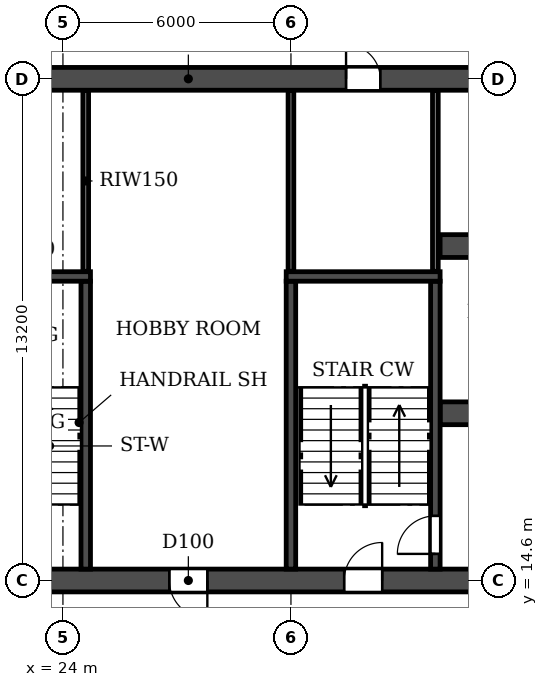
"""IFC4 building model, lengths in metres.
Left out: names, types, materials, properties, quantities, classifications, styles, units other than length and angle.
Written with IfcOpenShell. Run it as: python <this file> out.ifc"""

import sys

from ifc_helpers import new_model, si_unit, direction, frame, frame_2d, origin, place, context, subcontext, project, spatial, rectangle, extrude, element, fill, save


model = new_model("IFC4")
c1 = context("Model", 3, precision=1e-05, world=origin(), true_north=direction((0.0, 1.0)))
c2 = subcontext(c1, "Body", "Model", "MODEL_VIEW")
j1 = project(units=[si_unit("LENGTHUNIT", "METRE"), si_unit("PLANEANGLEUNIT", "RADIAN")], contexts=[c1])
p1 = place(None, origin())
s1 = spatial("IfcSite", under=j1, at=p1, CompositionType="ELEMENT")
p2 = place(p1, origin())
s2 = spatial("IfcBuilding", under=s1, at=p2, CompositionType="ELEMENT")
p3 = place(p2, frame((0.0, 0.0, 33.3)))
s3 = spatial("IfcBuildingStorey", under=s2, at=p3, CompositionType="ELEMENT", Elevation=33.3)
p4 = place(p3, frame((2.6, 14.6, 0.0), z_axis=(0.0, 0.0, 1.0), x_axis=(1.0, 0.0, 0.0)))
e1 = element("IfcWall", 1, at=p4, inside=s3, PredefinedType="SOLIDWALL", context=c2, shape_type="SweptSolid", body=[
    extrude(rectangle(XDim=96.8, YDim=0.6, at=frame_2d((48.4, 0.0))), origin(), (0.0, 0.0, 1.0), 3.05),
])
p5 = place(p4, frame((1.8, 0.0, 0.0)))
e2 = element("IfcOpeningElement", 2, at=p5, cuts=e1, PredefinedType="OPENING", context=c2, shape_type="SweptSolid", body=[
    extrude(rectangle(XDim=1.0, YDim=2.1, at=frame_2d((0.5, 1.05))), frame((0.0, 0.31, 0.0), z_axis=(0.0, -1.0, 0.0), x_axis=(1.0, 0.0, 0.0)), (0.0, 0.0, 1.0), 0.62),
])
p6 = place(p4, frame((9.5, 0.0, 0.0)))
e3 = element("IfcOpeningElement", 3, at=p6, cuts=e1, PredefinedType="OPENING", context=c2, shape_type="SweptSolid", body=[
    extrude(rectangle(XDim=1.0, YDim=2.1, at=frame_2d((0.5, 1.05))), frame((0.0, 0.31, 0.0), z_axis=(0.0, -1.0, 0.0), x_axis=(1.0, 0.0, 0.0)), (0.0, 0.0, 1.0), 0.62),
])
p7 = place(p4, frame((16.3, 0.0, 0.0)))
e4 = element("IfcOpeningElement", 4, at=p7, cuts=e1, PredefinedType="OPENING", context=c2, shape_type="SweptSolid", body=[
    extrude(rectangle(XDim=1.0, YDim=2.1, at=frame_2d((0.5, 1.05))), frame((0.0, 0.31, 0.0), z_axis=(0.0, -1.0, 0.0), x_axis=(1.0, 0.0, 0.0)), (0.0, 0.0, 1.0), 0.62),
])
p8 = place(p4, frame((24.2, 0.0, 0.0)))
e5 = element("IfcOpeningElement", 5, at=p8, cuts=e1, PredefinedType="OPENING", context=c2, shape_type="SweptSolid", body=[
    extrude(rectangle(XDim=1.0, YDim=2.1, at=frame_2d((0.5, 1.05))), frame((0.0, 0.31, 0.0), z_axis=(0.0, -1.0, 0.0), x_axis=(1.0, 0.0, 0.0)), (0.0, 0.0, 1.0), 0.62),
])
p9 = place(p4, frame((28.8, 0.0, 0.0)))
e6 = element("IfcOpeningElement", 6, at=p9, cuts=e1, PredefinedType="OPENING", context=c2, shape_type="SweptSolid", body=[
    extrude(rectangle(XDim=1.0, YDim=2.1, at=frame_2d((0.5, 1.05))), frame((0.0, 0.31, 0.0), z_axis=(0.0, -1.0, 0.0), x_axis=(1.0, 0.0, 0.0)), (0.0, 0.0, 1.0), 0.62),
])
p10 = place(p4, frame((42.7, 0.0, 0.0)))
e7 = element("IfcOpeningElement", 7, at=p10, cuts=e1, PredefinedType="OPENING", context=c2, shape_type="SweptSolid", body=[
    extrude(rectangle(XDim=1.0, YDim=2.1, at=frame_2d((0.5, 1.05))), frame((0.0, 0.31, 0.0), z_axis=(0.0, -1.0, 0.0), x_axis=(1.0, 0.0, 0.0)), (0.0, 0.0, 1.0), 0.62),
])
p11 = place(p4, frame((47.9, 0.0, 0.0)))
e8 = element("IfcOpeningElement", 8, at=p11, cuts=e1, PredefinedType="OPENING", context=c2, shape_type="SweptSolid", body=[
    extrude(rectangle(XDim=1.0, YDim=2.1, at=frame_2d((0.5, 1.05))), frame((0.0, 0.31, 0.0), z_axis=(0.0, -1.0, 0.0), x_axis=(1.0, 0.0, 0.0)), (0.0, 0.0, 1.0), 0.62),
])
p12 = place(p4, frame((53.1, 0.0, 0.0)))
e9 = element("IfcOpeningElement", 9, at=p12, cuts=e1, PredefinedType="OPENING", context=c2, shape_type="SweptSolid", body=[
    extrude(rectangle(XDim=1.0, YDim=2.1, at=frame_2d((0.5, 1.05))), frame((0.0, 0.31, 0.0), z_axis=(0.0, -1.0, 0.0), x_axis=(1.0, 0.0, 0.0)), (0.0, 0.0, 1.0), 0.62),
])
p13 = place(p4, frame((67.0, 0.0, 0.0)))
e10 = element("IfcOpeningElement", 10, at=p13, cuts=e1, PredefinedType="OPENING", context=c2, shape_type="SweptSolid", body=[
    extrude(rectangle(XDim=1.0, YDim=2.1, at=frame_2d((0.5, 1.05))), frame((0.0, 0.31, 0.0), z_axis=(0.0, -1.0, 0.0), x_axis=(1.0, 0.0, 0.0)), (0.0, 0.0, 1.0), 0.62),
])
p14 = place(p4, frame((71.6, 0.0, 0.0)))
e11 = element("IfcOpeningElement", 11, at=p14, cuts=e1, PredefinedType="OPENING", context=c2, shape_type="SweptSolid", body=[
    extrude(rectangle(XDim=1.0, YDim=2.1, at=frame_2d((0.5, 1.05))), frame((0.0, 0.31, 0.0), z_axis=(0.0, -1.0, 0.0), x_axis=(1.0, 0.0, 0.0)), (0.0, 0.0, 1.0), 0.62),
])
p15 = place(p4, frame((79.5, 0.0, 0.0)))
e12 = element("IfcOpeningElement", 12, at=p15, cuts=e1, PredefinedType="OPENING", context=c2, shape_type="SweptSolid", body=[
    extrude(rectangle(XDim=1.0, YDim=2.1, at=frame_2d((0.5, 1.05))), frame((0.0, 0.31, 0.0), z_axis=(0.0, -1.0, 0.0), x_axis=(1.0, 0.0, 0.0)), (0.0, 0.0, 1.0), 0.62),
])
p16 = place(p4, frame((88.6, 0.0, 0.0)))
e13 = element("IfcOpeningElement", 13, at=p16, cuts=e1, PredefinedType="OPENING", context=c2, shape_type="SweptSolid", body=[
    extrude(rectangle(XDim=1.0, YDim=2.1, at=frame_2d((0.5, 1.05))), frame((0.0, 0.31, 0.0), z_axis=(0.0, -1.0, 0.0), x_axis=(1.0, 0.0, 0.0)), (0.0, 0.0, 1.0), 0.62),
])
p17 = place(p3, frame((2.6, 27.8, 0.0), z_axis=(0.0, 0.0, 1.0), x_axis=(1.0, 0.0, 0.0)))
e14 = element("IfcWall", 14, at=p17, inside=s3, PredefinedType="SOLIDWALL", context=c2, shape_type="SweptSolid", body=[
    extrude(rectangle(XDim=96.8, YDim=0.6, at=frame_2d((48.4, 0.0))), origin(), (0.0, 0.0, 1.0), 3.05),
])
p18 = place(p17, frame((2.55, 0.0, 0.0)))
e15 = element("IfcOpeningElement", 15, at=p18, cuts=e14, PredefinedType="OPENING", context=c2, shape_type="SweptSolid", body=[
    extrude(rectangle(XDim=1.0, YDim=2.1, at=frame_2d((0.5, 1.05))), frame((0.0, 0.31, 0.0), z_axis=(0.0, -1.0, 0.0), x_axis=(1.0, 0.0, 0.0)), (0.0, 0.0, 1.0), 0.62),
])
p19 = place(p17, frame((10.25, 0.0, 0.0)))
e16 = element("IfcOpeningElement", 16, at=p19, cuts=e14, PredefinedType="OPENING", context=c2, shape_type="SweptSolid", body=[
    extrude(rectangle(XDim=1.0, YDim=2.1, at=frame_2d((0.5, 1.05))), frame((0.0, 0.31, 0.0), z_axis=(0.0, -1.0, 0.0), x_axis=(1.0, 0.0, 0.0)), (0.0, 0.0, 1.0), 0.62),
])
p20 = place(p17, frame((16.3, 0.0, 0.0)))
e17 = element("IfcOpeningElement", 17, at=p20, cuts=e14, PredefinedType="OPENING", context=c2, shape_type="SweptSolid", body=[
    extrude(rectangle(XDim=1.0, YDim=2.1, at=frame_2d((0.5, 1.05))), frame((0.0, 0.31, 0.0), z_axis=(0.0, -1.0, 0.0), x_axis=(1.0, 0.0, 0.0)), (0.0, 0.0, 1.0), 0.62),
])
p21 = place(p17, frame((19.65, 0.0, 0.0)))
e18 = element("IfcOpeningElement", 18, at=p21, cuts=e14, PredefinedType="OPENING", context=c2, shape_type="SweptSolid", body=[
    extrude(rectangle(XDim=0.9, YDim=2.1, at=frame_2d((0.45, 1.05))), frame((0.0, 0.31, 0.0), z_axis=(0.0, -1.0, 0.0), x_axis=(1.0, 0.0, 0.0)), (0.0, 0.0, 1.0), 0.62),
])
p22 = place(p17, frame((28.85, 0.0, 0.0)))
e19 = element("IfcOpeningElement", 19, at=p22, cuts=e14, PredefinedType="OPENING", context=c2, shape_type="SweptSolid", body=[
    extrude(rectangle(XDim=0.9, YDim=2.1, at=frame_2d((0.45, 1.05))), frame((0.0, 0.31, 0.0), z_axis=(0.0, -1.0, 0.0), x_axis=(1.0, 0.0, 0.0)), (0.0, 0.0, 1.0), 0.62),
])
p23 = place(p17, frame((34.6, 0.0, 0.0)))
e20 = element("IfcOpeningElement", 20, at=p23, cuts=e14, PredefinedType="OPENING", context=c2, shape_type="SweptSolid", body=[
    extrude(rectangle(XDim=1.0, YDim=2.1, at=frame_2d((0.5, 1.05))), frame((0.0, 0.31, 0.0), z_axis=(0.0, -1.0, 0.0), x_axis=(1.0, 0.0, 0.0)), (0.0, 0.0, 1.0), 0.62),
])
p24 = place(p17, frame((39.8, 0.0, 0.0)))
e21 = element("IfcOpeningElement", 21, at=p24, cuts=e14, PredefinedType="OPENING", context=c2, shape_type="SweptSolid", body=[
    extrude(rectangle(XDim=1.0, YDim=2.1, at=frame_2d((0.5, 1.05))), frame((0.0, 0.31, 0.0), z_axis=(0.0, -1.0, 0.0), x_axis=(1.0, 0.0, 0.0)), (0.0, 0.0, 1.0), 0.62),
])
p25 = place(p17, frame((45.0, 0.0, 0.0)))
e22 = element("IfcOpeningElement", 22, at=p25, cuts=e14, PredefinedType="OPENING", context=c2, shape_type="SweptSolid", body=[
    extrude(rectangle(XDim=1.0, YDim=2.1, at=frame_2d((0.5, 1.05))), frame((0.0, 0.31, 0.0), z_axis=(0.0, -1.0, 0.0), x_axis=(1.0, 0.0, 0.0)), (0.0, 0.0, 1.0), 0.62),
])
p26 = place(p17, frame((47.9, 0.0, 0.0)))
e23 = element("IfcOpeningElement", 23, at=p26, cuts=e14, PredefinedType="OPENING", context=c2, shape_type="SweptSolid", body=[
    extrude(rectangle(XDim=1.0, YDim=2.1, at=frame_2d((0.5, 1.05))), frame((0.0, 0.31, 0.0), z_axis=(0.0, -1.0, 0.0), x_axis=(1.0, 0.0, 0.0)), (0.0, 0.0, 1.0), 0.62),
])
p27 = place(p17, frame((50.8, 0.0, 0.0)))
e24 = element("IfcOpeningElement", 24, at=p27, cuts=e14, PredefinedType="OPENING", context=c2, shape_type="SweptSolid", body=[
    extrude(rectangle(XDim=1.0, YDim=2.1, at=frame_2d((0.5, 1.05))), frame((0.0, 0.31, 0.0), z_axis=(0.0, -1.0, 0.0), x_axis=(1.0, 0.0, 0.0)), (0.0, 0.0, 1.0), 0.62),
])
p28 = place(p17, frame((54.7, 0.0, 0.0)))
e25 = element("IfcOpeningElement", 25, at=p28, cuts=e14, PredefinedType="OPENING", context=c2, shape_type="SweptSolid", body=[
    extrude(rectangle(XDim=1.0, YDim=2.1, at=frame_2d((0.5, 1.05))), frame((0.0, 0.31, 0.0), z_axis=(0.0, -1.0, 0.0), x_axis=(1.0, 0.0, 0.0)), (0.0, 0.0, 1.0), 0.62),
])
p29 = place(p17, frame((61.2, 0.0, 0.0)))
e26 = element("IfcOpeningElement", 26, at=p29, cuts=e14, PredefinedType="OPENING", context=c2, shape_type="SweptSolid", body=[
    extrude(rectangle(XDim=1.0, YDim=2.1, at=frame_2d((0.5, 1.05))), frame((0.0, 0.31, 0.0), z_axis=(0.0, -1.0, 0.0), x_axis=(1.0, 0.0, 0.0)), (0.0, 0.0, 1.0), 0.62),
])
p30 = place(p17, frame((67.05, 0.0, 0.0)))
e27 = element("IfcOpeningElement", 27, at=p30, cuts=e14, PredefinedType="OPENING", context=c2, shape_type="SweptSolid", body=[
    extrude(rectangle(XDim=0.9, YDim=2.1, at=frame_2d((0.45, 1.05))), frame((0.0, 0.31, 0.0), z_axis=(0.0, -1.0, 0.0), x_axis=(1.0, 0.0, 0.0)), (0.0, 0.0, 1.0), 0.62),
])
p31 = place(p17, frame((76.25, 0.0, 0.0)))
e28 = element("IfcOpeningElement", 28, at=p31, cuts=e14, PredefinedType="OPENING", context=c2, shape_type="SweptSolid", body=[
    extrude(rectangle(XDim=0.9, YDim=2.1, at=frame_2d((0.45, 1.05))), frame((0.0, 0.31, 0.0), z_axis=(0.0, -1.0, 0.0), x_axis=(1.0, 0.0, 0.0)), (0.0, 0.0, 1.0), 0.62),
])
p32 = place(p17, frame((79.5, 0.0, 0.0)))
e29 = element("IfcOpeningElement", 29, at=p32, cuts=e14, PredefinedType="OPENING", context=c2, shape_type="SweptSolid", body=[
    extrude(rectangle(XDim=1.0, YDim=2.1, at=frame_2d((0.5, 1.05))), frame((0.0, 0.31, 0.0), z_axis=(0.0, -1.0, 0.0), x_axis=(1.0, 0.0, 0.0)), (0.0, 0.0, 1.0), 0.62),
])
p33 = place(p17, frame((86.05, 0.0, 0.0)))
e30 = element("IfcOpeningElement", 30, at=p33, cuts=e14, PredefinedType="OPENING", context=c2, shape_type="SweptSolid", body=[
    extrude(rectangle(XDim=1.5, YDim=2.1, at=frame_2d((0.75, 1.05))), frame((0.0, 0.31, 0.0), z_axis=(0.0, -1.0, 0.0), x_axis=(1.0, 0.0, 0.0)), (0.0, 0.0, 1.0), 0.62),
])
p34 = place(p17, frame((94.0, 0.0, 0.0)))
e31 = element("IfcOpeningElement", 31, at=p34, cuts=e14, PredefinedType="OPENING", context=c2, shape_type="SweptSolid", body=[
    extrude(rectangle(XDim=1.0, YDim=2.1, at=frame_2d((0.5, 1.05))), frame((0.0, 0.31, 0.0), z_axis=(0.0, -1.0, 0.0), x_axis=(1.0, 0.0, 0.0)), (0.0, 0.0, 1.0), 0.62),
])
p35 = place(p3, frame((33.925, 19.0, 0.0), z_axis=(0.0, 0.0, 1.0), x_axis=(1.0, 0.0, 0.0)))
e32 = element("IfcWall", 32, at=p35, inside=s3, PredefinedType="SOLIDWALL", context=c2, shape_type="SweptSolid", body=[
    extrude(rectangle(XDim=34.15, YDim=0.6, at=frame_2d((17.075, 0.0))), origin(), (0.0, 0.0, 1.0), 3.05),
])
p36 = place(p35, frame((16.175, 0.0, 0.0)))
e33 = element("IfcOpeningElement", 33, at=p36, cuts=e32, PredefinedType="OPENING", context=c2, shape_type="SweptSolid", body=[
    extrude(rectangle(XDim=1.8, YDim=2.1, at=frame_2d((0.9, 1.05))), frame((0.0, 0.31, 0.0), z_axis=(0.0, -1.0, 0.0), x_axis=(1.0, 0.0, 0.0)), (0.0, 0.0, 1.0), 0.62),
])
p37 = place(p35, frame((1.525, 0.0, 0.0)))
e34 = element("IfcOpeningElement", 34, at=p37, cuts=e32, PredefinedType="OPENING", context=c2, shape_type="SweptSolid", body=[
    extrude(rectangle(XDim=1.8, YDim=2.1, at=frame_2d((0.9, 1.05))), frame((0.0, 0.31, 0.0), z_axis=(0.0, -1.0, 0.0), x_axis=(1.0, 0.0, 0.0)), (0.0, 0.0, 1.0), 0.62),
])
p38 = place(p35, frame((8.725, 0.0, 0.0)))
e35 = element("IfcOpeningElement", 35, at=p38, cuts=e32, PredefinedType="OPENING", context=c2, shape_type="SweptSolid", body=[
    extrude(rectangle(XDim=1.1, YDim=2.1, at=frame_2d((0.55, 1.05))), frame((0.0, 0.31, 0.0), z_axis=(0.0, -1.0, 0.0), x_axis=(1.0, 0.0, 0.0)), (0.0, 0.0, 1.0), 0.62),
])
p39 = place(p35, frame((11.325, 0.0, 0.0)))
e36 = element("IfcOpeningElement", 36, at=p39, cuts=e32, PredefinedType="OPENING", context=c2, shape_type="SweptSolid", body=[
    extrude(rectangle(XDim=1.1, YDim=2.1, at=frame_2d((0.55, 1.05))), frame((0.0, 0.31, 0.0), z_axis=(0.0, -1.0, 0.0), x_axis=(1.0, 0.0, 0.0)), (0.0, 0.0, 1.0), 0.62),
])
p40 = place(p35, frame((13.925, 0.0, 0.0)))
e37 = element("IfcOpeningElement", 37, at=p40, cuts=e32, PredefinedType="OPENING", context=c2, shape_type="SweptSolid", body=[
    extrude(rectangle(XDim=1.1, YDim=2.1, at=frame_2d((0.55, 1.05))), frame((0.0, 0.31, 0.0), z_axis=(0.0, -1.0, 0.0), x_axis=(1.0, 0.0, 0.0)), (0.0, 0.0, 1.0), 0.62),
])
p41 = place(p35, frame((19.125, 0.0, 0.0)))
e38 = element("IfcOpeningElement", 38, at=p41, cuts=e32, PredefinedType="OPENING", context=c2, shape_type="SweptSolid", body=[
    extrude(rectangle(XDim=1.1, YDim=2.1, at=frame_2d((0.55, 1.05))), frame((0.0, 0.31, 0.0), z_axis=(0.0, -1.0, 0.0), x_axis=(1.0, 0.0, 0.0)), (0.0, 0.0, 1.0), 0.62),
])
p42 = place(p35, frame((21.725, 0.0, 0.0)))
e39 = element("IfcOpeningElement", 39, at=p42, cuts=e32, PredefinedType="OPENING", context=c2, shape_type="SweptSolid", body=[
    extrude(rectangle(XDim=1.1, YDim=2.1, at=frame_2d((0.55, 1.05))), frame((0.0, 0.31, 0.0), z_axis=(0.0, -1.0, 0.0), x_axis=(1.0, 0.0, 0.0)), (0.0, 0.0, 1.0), 0.62),
])
p43 = place(p35, frame((24.325, 0.0, 0.0)))
e40 = element("IfcOpeningElement", 40, at=p43, cuts=e32, PredefinedType="OPENING", context=c2, shape_type="SweptSolid", body=[
    extrude(rectangle(XDim=1.1, YDim=2.1, at=frame_2d((0.55, 1.05))), frame((0.0, 0.31, 0.0), z_axis=(0.0, -1.0, 0.0), x_axis=(1.0, 0.0, 0.0)), (0.0, 0.0, 1.0), 0.62),
])
p44 = place(p35, frame((30.825, 0.0, 0.0)))
e41 = element("IfcOpeningElement", 41, at=p44, cuts=e32, PredefinedType="OPENING", context=c2, shape_type="SweptSolid", body=[
    extrude(rectangle(XDim=1.8, YDim=2.1, at=frame_2d((0.9, 1.05))), frame((0.0, 0.31, 0.0), z_axis=(0.0, -1.0, 0.0), x_axis=(1.0, 0.0, 0.0)), (0.0, 0.0, 1.0), 0.62),
])
p45 = place(p3, frame((33.925, 23.4, 0.0), z_axis=(0.0, 0.0, 1.0), x_axis=(1.0, 0.0, 0.0)))
e42 = element("IfcWall", 42, at=p45, inside=s3, PredefinedType="SOLIDWALL", context=c2, shape_type="SweptSolid", body=[
    extrude(rectangle(XDim=34.15, YDim=0.6, at=frame_2d((17.075, 0.0))), origin(), (0.0, 0.0, 1.0), 3.05),
])
p46 = place(p45, frame((16.175, 0.0, 0.0)))
e43 = element("IfcOpeningElement", 43, at=p46, cuts=e42, PredefinedType="OPENING", context=c2, shape_type="SweptSolid", body=[
    extrude(rectangle(XDim=1.8, YDim=2.1, at=frame_2d((0.9, 1.05))), frame((0.0, 0.31, 0.0), z_axis=(0.0, -1.0, 0.0), x_axis=(1.0, 0.0, 0.0)), (0.0, 0.0, 1.0), 0.62),
])
p47 = place(p45, frame((11.025, 0.0, 0.0)))
e44 = element("IfcOpeningElement", 44, at=p47, cuts=e42, PredefinedType="OPENING", context=c2, shape_type="SweptSolid", body=[
    extrude(rectangle(XDim=1.1, YDim=2.1, at=frame_2d((0.55, 1.05))), frame((0.0, 0.31, 0.0), z_axis=(0.0, -1.0, 0.0), x_axis=(1.0, 0.0, 0.0)), (0.0, 0.0, 1.0), 0.62),
])
p48 = place(p3, frame((30.0, 14.9, 0.0), z_axis=(0.0, 0.0, 1.0), x_axis=(0.0, 1.0, 0.0)))
e45 = element("IfcWall", 45, at=p48, inside=s3, PredefinedType="SOLIDWALL", context=c2, shape_type="SweptSolid", body=[
    extrude(rectangle(XDim=7.575, YDim=0.25, at=frame_2d((3.788, 0.0))), origin(), (0.0, 0.0, 1.0), 3.05),
])
p49 = place(p3, frame((33.8, 14.9, 0.0), z_axis=(0.0, 0.0, 1.0), x_axis=(0.0, 1.0, 0.0)))
e46 = element("IfcWall", 46, at=p49, inside=s3, PredefinedType="SOLIDWALL", context=c2, shape_type="SweptSolid", body=[
    extrude(rectangle(XDim=7.575, YDim=0.25, at=frame_2d((3.788, 0.0))), origin(), (0.0, 0.0, 1.0), 3.05),
])
p50 = place(p49, frame((0.4, 0.0, 0.0)))
e47 = element("IfcOpeningElement", 47, at=p50, cuts=e46, PredefinedType="OPENING", context=c2, shape_type="SweptSolid", body=[
    extrude(rectangle(XDim=1.0, YDim=2.1, at=frame_2d((0.5, 1.05))), frame((0.0, 0.135, 0.0), z_axis=(0.0, -1.0, 0.0), x_axis=(1.0, 0.0, 0.0)), (0.0, 0.0, 1.0), 0.27),
])
p51 = place(p3, frame((29.875, 22.6, 0.0), z_axis=(0.0, 0.0, 1.0), x_axis=(1.0, 0.0, 0.0)))
e48 = element("IfcWall", 48, at=p51, inside=s3, PredefinedType="SOLIDWALL", context=c2, shape_type="SweptSolid", body=[
    extrude(rectangle(XDim=4.05, YDim=0.25, at=frame_2d((2.025, 0.0))), origin(), (0.0, 0.0, 1.0), 3.05),
])
p52 = place(p3, frame((24.6, 14.9, 0.0), z_axis=(0.0, 0.0, 1.0), x_axis=(0.0, 1.0, 0.0)))
e49 = element("IfcWall", 49, at=p52, inside=s3, PredefinedType="SOLIDWALL", context=c2, shape_type="SweptSolid", body=[
    extrude(rectangle(XDim=7.575, YDim=0.25, at=frame_2d((3.788, 0.0))), origin(), (0.0, 0.0, 1.0), 3.05),
])
p53 = place(p3, frame((20.675, 22.6, 0.0), z_axis=(0.0, 0.0, 1.0), x_axis=(1.0, 0.0, 0.0)))
e50 = element("IfcWall", 50, at=p53, inside=s3, PredefinedType="SOLIDWALL", context=c2, shape_type="SweptSolid", body=[
    extrude(rectangle(XDim=4.05, YDim=0.25, at=frame_2d((2.025, 0.0))), origin(), (0.0, 0.0, 1.0), 3.05),
])
for number, where, z_axis, x_axis in (
    (51, (24.6, 22.735, 0.0), (0.0, 0.0, 1.0), (0.0, 1.0, 0.0)),
    (52, (30.0, 22.735, 0.0), (0.0, 0.0, 1.0), (0.0, 1.0, 0.0)),
    (53, (33.8, 22.735, 0.0), (0.0, 0.0, 1.0), (0.0, 1.0, 0.0)),
):
    element("IfcWall", number, at=place(p3, frame(where, z_axis=z_axis, x_axis=x_axis)), inside=s3, PredefinedType="PARTITIONING", context=c2, shape_type="SweptSolid", body=[
        extrude(rectangle(XDim=4.755, YDim=0.15, at=frame_2d((2.377, 0.0))), origin(), (0.0, 0.0, 1.0), 3.05),
    ])
p54 = place(p22, origin())
e54 = element("IfcDoor", 54, at=p54, inside=s3, OperationType="SINGLE_SWING_LEFT", PredefinedType="DOOR", context=c2, shape_type="SweptSolid", body=[
    extrude(rectangle(XDim=0.9, YDim=2.1, at=frame_2d((0.45, 1.05))), frame((0.0, 0.025, 0.0), z_axis=(0.0, -1.0, 0.0), x_axis=(1.0, 0.0, 0.0)), (0.0, 0.0, 1.0), 0.05),
])
fill(e19, e54)
p55 = place(p8, frame((1.0, 0.0, 0.0), z_axis=(0.0, 0.0, 1.0), x_axis=(-1.0, 0.0, 0.0)))
e55 = element("IfcDoor", 55, at=p55, inside=s3, OperationType="SINGLE_SWING_LEFT", PredefinedType="DOOR", context=c2, shape_type="SweptSolid", body=[
    extrude(rectangle(XDim=1.0, YDim=2.1, at=frame_2d((0.5, 1.05))), frame((0.0, 0.025, 0.0), z_axis=(0.0, -1.0, 0.0), x_axis=(1.0, 0.0, 0.0)), (0.0, 0.0, 1.0), 0.05),
])
fill(e5, e55)
p56 = place(p9, origin())
e56 = element("IfcDoor", 56, at=p56, inside=s3, OperationType="SINGLE_SWING_RIGHT", PredefinedType="DOOR", context=c2, shape_type="SweptSolid", body=[
    extrude(rectangle(XDim=1.0, YDim=2.1, at=frame_2d((0.5, 1.05))), frame((0.0, 0.025, 0.0), z_axis=(0.0, -1.0, 0.0), x_axis=(1.0, 0.0, 0.0)), (0.0, 0.0, 1.0), 0.05),
])
fill(e6, e56)
p57 = place(p50, origin())
e57 = element("IfcDoor", 57, at=p57, inside=s3, OperationType="SINGLE_SWING_LEFT", PredefinedType="DOOR", context=c2, shape_type="SweptSolid", body=[
    extrude(rectangle(XDim=1.0, YDim=2.1, at=frame_2d((0.5, 1.05))), frame((0.0, 0.025, 0.0), z_axis=(0.0, -1.0, 0.0), x_axis=(1.0, 0.0, 0.0)), (0.0, 0.0, 1.0), 0.05),
])
fill(e47, e57)
save(model, sys.argv[1])
